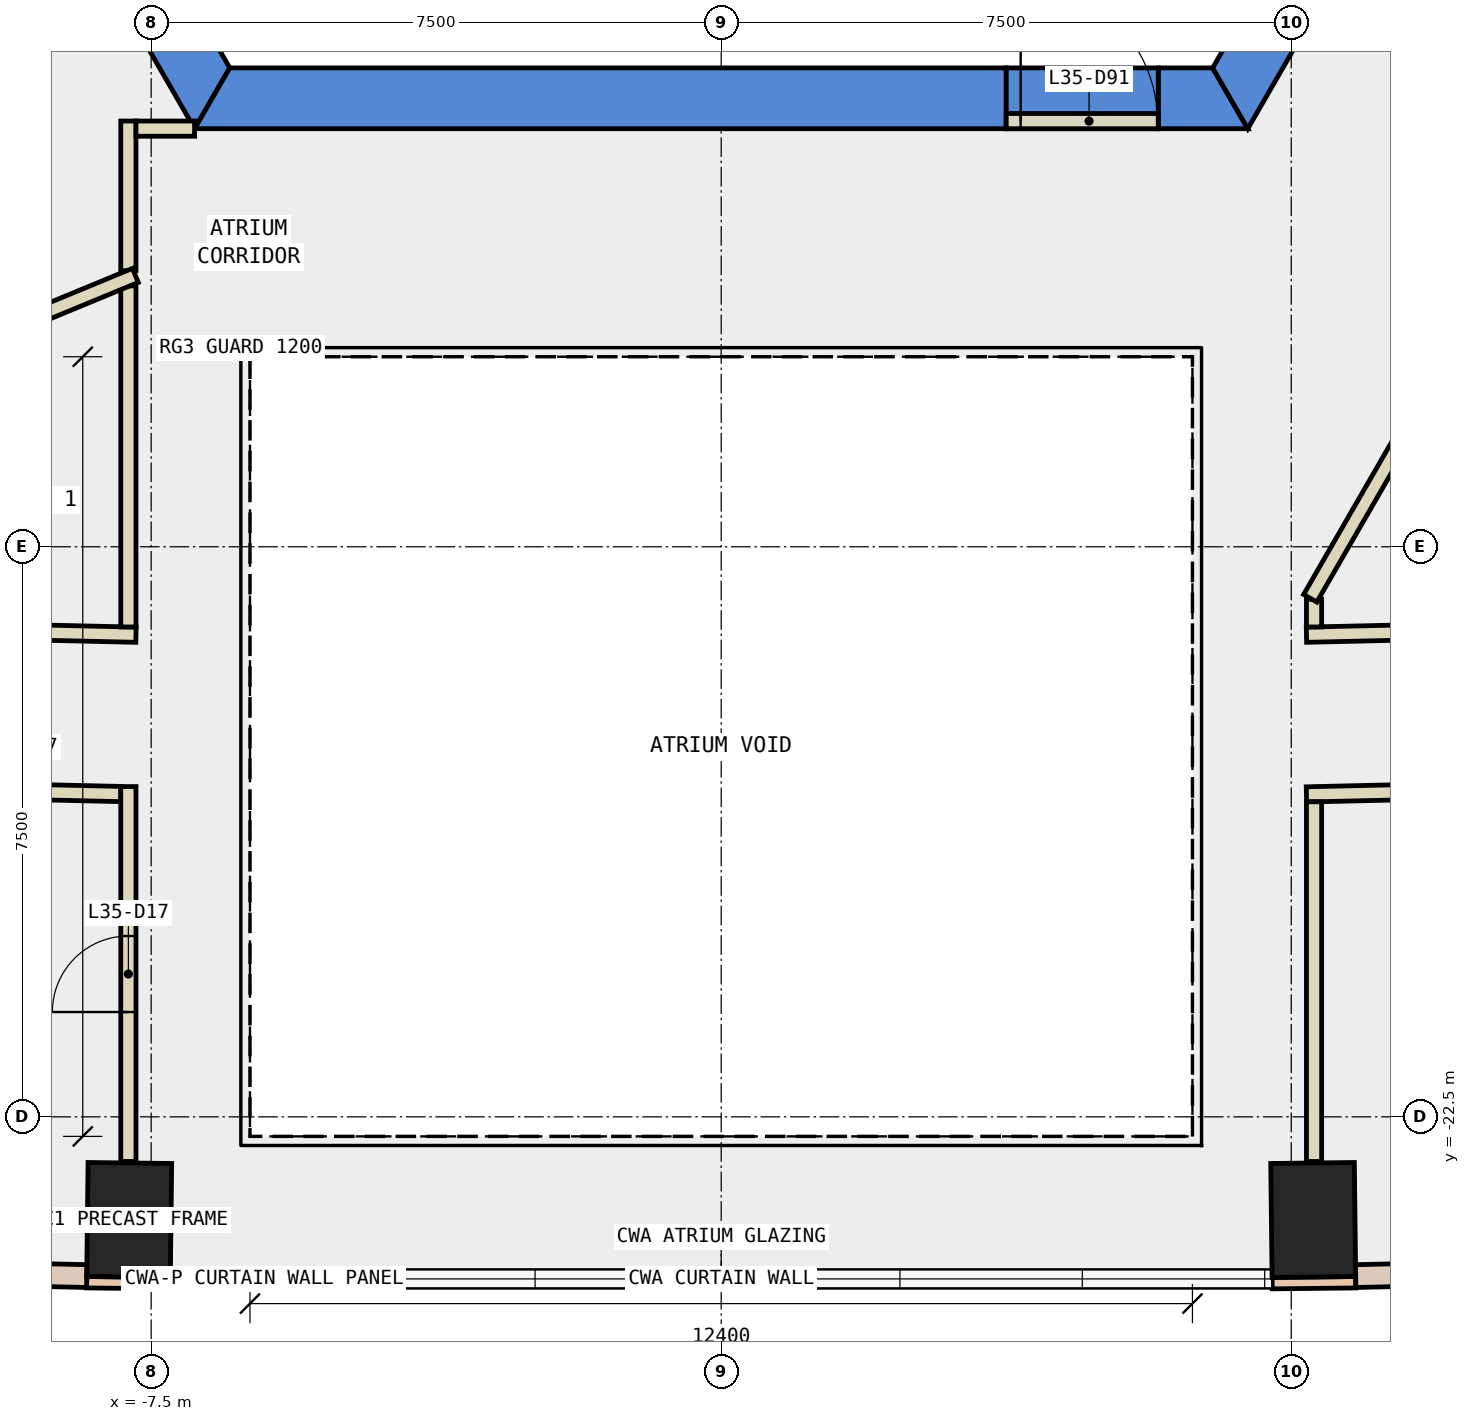
"""IFC4 building model, lengths in metres.
Left out: names, types, materials, properties, quantities, classifications, styles, units other than length and angle.
Written with IfcOpenShell. Run it as: python <this file> out.ifc"""

import sys

from ifc_helpers import new_model, si_unit, direction, frame, frame_2d, origin, origin_2d, place, context, subcontext, project, spatial, polyline, rectangle, outline, extrude, element, fill, save


model = new_model("IFC4")
c1 = context("Model", 3, precision=1e-05, world=origin(), true_north=direction((0.0, 1.0)))
c2 = subcontext(c1, "Body", "Model", "MODEL_VIEW")
j1 = project(units=[si_unit("LENGTHUNIT", "METRE"), si_unit("PLANEANGLEUNIT", "RADIAN")], contexts=[c1])
p1 = place(None, origin())
s1 = spatial("IfcSite", under=j1, at=p1, CompositionType="ELEMENT")
p2 = place(p1, origin())
s2 = spatial("IfcBuilding", under=s1, at=p2, CompositionType="ELEMENT")
p3 = place(p2, frame((0.0, 0.0, 159.2)))
s3 = spatial("IfcBuildingStorey", under=s2, at=p3, CompositionType="ELEMENT", Elevation=159.2)
for number, where, z_axis, x_axis in (
    (1, (-7.789, -23.857, -0.4), (0.0, 0.0, 1.0), (-1.0, 0.012, 0.0)),
    (2, (7.789, -23.857, -0.4), (0.0, 0.0, 1.0), (1.0, 0.012, 0.0)),
):
    element("IfcColumn", number, at=place(p3, frame(where, z_axis=z_axis, x_axis=x_axis)), inside=s3, PredefinedType="COLUMN", context=c2, shape_type="SweptSolid", body=[
        extrude(rectangle(XDim=1.1, YDim=1.5, at=origin_2d()), origin(), (0.0, 0.0, 1.0), 4.2),
    ])
p4 = place(p3, frame((0.0, 0.0, -0.4)))
e3 = element("IfcWall", 3, at=p4, inside=s3, PredefinedType="SHEAR", context=c2, shape_type="SweptSolid", body=[
    extrude(outline(polyline([(-13.856, 2.5), (-6.928, -9.5), (-6.466, -8.7), (-12.933, 2.5), (-13.856, 2.5)])), origin(), (0.0, 0.0, 1.0), 4.2),
])
p5 = place(p3, frame((0.0, 0.0, -0.4)))
e4 = element("IfcWall", 4, at=p5, inside=s3, PredefinedType="SHEAR", context=c2, shape_type="SweptSolid", body=[
    extrude(outline(polyline([(3.75, -9.5), (3.75, -8.7), (-6.466, -8.7), (-6.928, -9.5), (3.75, -9.5)])), origin(), (0.0, 0.0, 1.0), 4.2),
])
p6 = place(p3, frame((0.0, 0.0, -0.4)))
e5 = element("IfcWall", 5, at=p6, inside=s3, PredefinedType="SHEAR", context=c2, shape_type="SweptSolid", body=[
    extrude(outline(polyline([(5.75, -8.7), (5.75, -9.5), (6.928, -9.5), (6.466, -8.7), (5.75, -8.7)])), origin(), (0.0, 0.0, 1.0), 4.2),
])
p7 = place(p3, frame((0.0, 0.0, 3.6)))
e6 = element("IfcWall", 6, at=p7, inside=s3, PredefinedType="SHEAR", context=c2, shape_type="SweptSolid", body=[
    extrude(outline(polyline([(5.75, -9.5), (5.75, -8.7), (3.75, -8.7), (3.75, -9.5), (5.75, -9.5)])), origin(), (0.0, 0.0, 1.0), 0.2),
])
p8 = place(p3, frame((0.0, 0.0, -0.4)))
e7 = element("IfcWall", 7, at=p8, inside=s3, PredefinedType="SHEAR", context=c2, shape_type="SweptSolid", body=[
    extrude(outline(polyline([(8.117, -7.44), (7.424, -7.04), (6.466, -8.7), (6.928, -9.5), (8.117, -7.44)])), origin(), (0.0, 0.0, 1.0), 4.2),
])
for number, where, z_axis, x_axis in (
    (8, (-8.349, -24.676, 0.0), (0.0, 0.0, 1.0), (1.0, -0.011, 0.0)),
    (9, (7.249, -24.688, 0.0), (0.0, 0.0, 1.0), (1.0, 0.011, 0.0)),
):
    element("IfcWall", number, at=place(p3, frame(where, z_axis=z_axis, x_axis=x_axis)), inside=s3, PredefinedType="STANDARD", context=c2, shape_type="SweptSolid", body=[
        extrude(rectangle(XDim=1.1, YDim=0.15, at=frame_2d((0.55, 0.0))), origin(), (0.0, 0.0, 1.0), 3.8),
    ])
p9 = place(p3, frame((-15.68, -24.429, 0.0), z_axis=(0.0, 0.0, 1.0), x_axis=(0.999743825009, -0.022633699594, 0.0)))
e10 = element("IfcWall", 10, at=p9, inside=s3, PredefinedType="STANDARD", context=c2, shape_type="SweptSolid", body=[
    extrude(rectangle(XDim=7.335, YDim=0.3, at=frame_2d((3.667, 0.0))), origin(), (0.0, 0.0, 1.0), 3.8),
])
p10 = place(p9, frame((0.634, 0.0, 0.9)))
e11 = element("IfcOpeningElement", 11, at=p10, cuts=e10, PredefinedType="OPENING", context=c2, shape_type="SweptSolid", body=[
    extrude(rectangle(XDim=2.4, YDim=2.6, at=frame_2d((1.2, 1.3))), frame((0.0, 0.16, 0.0), z_axis=(0.0, -1.0, 0.0), x_axis=(1.0, 0.0, 0.0)), (0.0, 0.0, 1.0), 0.32),
])
p11 = place(p9, frame((4.301, 0.0, 0.9)))
e12 = element("IfcOpeningElement", 12, at=p11, cuts=e10, PredefinedType="OPENING", context=c2, shape_type="SweptSolid", body=[
    extrude(rectangle(XDim=2.4, YDim=2.6, at=frame_2d((1.2, 1.3))), frame((0.0, 0.16, 0.0), z_axis=(0.0, -1.0, 0.0), x_axis=(1.0, 0.0, 0.0)), (0.0, 0.0, 1.0), 0.32),
])
p12 = place(p3, frame((8.347, -24.595, 0.0), z_axis=(0.0, 0.0, 1.0), x_axis=(0.999743825009, 0.022633699594, 0.0)))
e13 = element("IfcWall", 13, at=p12, inside=s3, PredefinedType="STANDARD", context=c2, shape_type="SweptSolid", body=[
    extrude(rectangle(XDim=7.335, YDim=0.3, at=frame_2d((3.667, 0.0))), origin(), (0.0, 0.0, 1.0), 3.8),
])
p13 = place(p12, frame((0.634, 0.0, 0.9)))
e14 = element("IfcOpeningElement", 14, at=p13, cuts=e13, PredefinedType="OPENING", context=c2, shape_type="SweptSolid", body=[
    extrude(rectangle(XDim=2.4, YDim=2.6, at=frame_2d((1.2, 1.3))), frame((0.0, 0.16, 0.0), z_axis=(0.0, -1.0, 0.0), x_axis=(1.0, 0.0, 0.0)), (0.0, 0.0, 1.0), 0.32),
])
p14 = place(p12, frame((4.301, 0.0, 0.9)))
e15 = element("IfcOpeningElement", 15, at=p14, cuts=e13, PredefinedType="OPENING", context=c2, shape_type="SweptSolid", body=[
    extrude(rectangle(XDim=2.4, YDim=2.6, at=frame_2d((1.2, 1.3))), frame((0.0, 0.16, 0.0), z_axis=(0.0, -1.0, 0.0), x_axis=(1.0, 0.0, 0.0)), (0.0, 0.0, 1.0), 0.32),
])
p15 = place(p3, frame((7.7, -16.157, 0.0), z_axis=(0.0, 0.0, 1.0), x_axis=(0.999744539931, 0.022602098978, 0.0)))
e16 = element("IfcWall", 16, at=p15, inside=s3, PredefinedType="PARTITIONING", context=c2, shape_type="SweptSolid", body=[
    extrude(rectangle(XDim=8.274, YDim=0.2, at=frame_2d((4.137, 0.0))), origin(), (0.0, 0.0, 1.0), 3.8),
])
p16 = place(p15, frame((3.237, 0.0, 0.0)))
e17 = element("IfcOpeningElement", 17, at=p16, cuts=e16, PredefinedType="OPENING", context=c2, shape_type="SweptSolid", body=[
    extrude(rectangle(XDim=1.8, YDim=2.1, at=frame_2d((0.9, 1.05))), frame((0.0, 0.11, 0.0), z_axis=(0.0, -1.0, 0.0), x_axis=(1.0, 0.0, 0.0)), (0.0, 0.0, 1.0), 0.22),
])
p17 = place(p3, frame((-14.356, -16.006, 0.0), z_axis=(0.0, 0.0, 1.0), x_axis=(0.999743177933, -0.022662263286, 0.0)))
e18 = element("IfcWall", 18, at=p17, inside=s3, PredefinedType="PARTITIONING", context=c2, shape_type="SweptSolid", body=[
    extrude(rectangle(XDim=6.658, YDim=0.2, at=frame_2d((3.329, 0.0))), origin(), (0.0, 0.0, 1.0), 3.8),
])
p18 = place(p17, frame((2.829, 0.0, 0.0)))
e19 = element("IfcOpeningElement", 19, at=p18, cuts=e18, PredefinedType="OPENING", context=c2, shape_type="SweptSolid", body=[
    extrude(rectangle(XDim=1.0, YDim=2.1, at=frame_2d((0.5, 1.05))), frame((0.0, 0.11, 0.0), z_axis=(0.0, -1.0, 0.0), x_axis=(1.0, 0.0, 0.0)), (0.0, 0.0, 1.0), 0.22),
])
p19 = place(p3, frame((16.111, -18.067, 0.0), z_axis=(0.0, 0.0, 1.0), x_axis=(-0.999741835545, -0.022721405353, 0.0)))
e20 = element("IfcWall", 20, at=p19, inside=s3, PredefinedType="PARTITIONING", context=c2, shape_type="SweptSolid", body=[
    extrude(rectangle(XDim=8.413, YDim=0.2, at=frame_2d((4.207, 0.0))), origin(), (0.0, 0.0, 1.0), 3.8),
])
p20 = place(p19, frame((3.706, 0.0, 0.0)))
e21 = element("IfcOpeningElement", 21, at=p20, cuts=e20, PredefinedType="OPENING", context=c2, shape_type="SweptSolid", body=[
    extrude(rectangle(XDim=1.0, YDim=2.1, at=frame_2d((0.5, 1.05))), frame((0.0, 0.11, 0.0), z_axis=(0.0, -1.0, 0.0), x_axis=(1.0, 0.0, 0.0)), (0.0, 0.0, 1.0), 0.22),
])
p21 = place(p3, frame((-7.9, -18.253, 0.0), z_axis=(0.0, 0.0, 1.0), x_axis=(-0.999745510411, 0.022559131487, 0.0)))
e22 = element("IfcWall", 22, at=p21, inside=s3, PredefinedType="PARTITIONING", context=c2, shape_type="SweptSolid", body=[
    extrude(rectangle(XDim=3.896, YDim=0.2, at=frame_2d((1.948, 0.0))), origin(), (0.0, 0.0, 1.0), 3.8),
])
p22 = place(p3, frame((7.8, -15.69, 0.0), z_axis=(0.0, 0.0, 1.0), x_axis=(0.0, -1.0, 0.0)))
e23 = element("IfcWall", 23, at=p22, inside=s3, PredefinedType="PARTITIONING", context=c2, shape_type="SweptSolid", body=[
    extrude(rectangle(XDim=0.365, YDim=0.2, at=frame_2d((0.183, 0.0))), origin(), (0.0, 0.0, 1.0), 3.8),
])
p23 = place(p3, frame((-7.8, -11.368, 0.0), z_axis=(0.0, 0.0, 1.0), x_axis=(0.0, 1.0, 0.0)))
e24 = element("IfcWall", 24, at=p23, inside=s3, PredefinedType="PARTITIONING", context=c2, shape_type="SweptSolid", body=[
    extrude(rectangle(XDim=1.969, YDim=0.2, at=frame_2d((0.984, 0.0))), origin(), (0.0, 0.0, 1.0), 3.8),
])
p24 = place(p3, frame((-7.7, -9.499, 0.0), z_axis=(0.0, 0.0, 1.0), x_axis=(1.0, 0.0, 0.0)))
e25 = element("IfcWall", 25, at=p24, inside=s3, PredefinedType="PARTITIONING", context=c2, shape_type="SweptSolid", body=[
    extrude(rectangle(XDim=0.771, YDim=0.2, at=frame_2d((0.385, 0.0))), origin(), (0.0, 0.0, 1.0), 3.8),
])
p25 = place(p3, frame((-7.8, -16.055, 0.0), z_axis=(0.0, 0.0, 1.0), x_axis=(0.0, 1.0, 0.0)))
e26 = element("IfcWall", 26, at=p25, inside=s3, PredefinedType="PARTITIONING", context=c2, shape_type="SweptSolid", body=[
    extrude(rectangle(XDim=4.487, YDim=0.2, at=frame_2d((2.243, 0.0))), origin(), (0.0, 0.0, 1.0), 3.8),
])
p26 = place(p3, frame((7.8, -18.355, 0.0), z_axis=(0.0, 0.0, 1.0), x_axis=(0.0, -1.0, 0.0)))
e27 = element("IfcWall", 27, at=p26, inside=s3, PredefinedType="PARTITIONING", context=c2, shape_type="SweptSolid", body=[
    extrude(rectangle(XDim=4.732, YDim=0.2, at=frame_2d((2.366, 0.0))), origin(), (0.0, 0.0, 1.0), 3.8),
])
p27 = place(p3, frame((-7.8, -23.087, 0.0), z_axis=(0.0, 0.0, 1.0), x_axis=(0.0, 1.0, 0.0)))
e28 = element("IfcWall", 28, at=p27, inside=s3, PredefinedType="PARTITIONING", context=c2, shape_type="SweptSolid", body=[
    extrude(rectangle(XDim=4.932, YDim=0.2, at=frame_2d((2.466, 0.0))), origin(), (0.0, 0.0, 1.0), 3.8),
])
p28 = place(p27, frame((1.966, 0.0, 0.0)))
e29 = element("IfcOpeningElement", 29, at=p28, cuts=e28, PredefinedType="OPENING", context=c2, shape_type="SweptSolid", body=[
    extrude(rectangle(XDim=1.0, YDim=2.1, at=frame_2d((0.5, 1.05))), frame((0.0, 0.11, 0.0), z_axis=(0.0, -1.0, 0.0), x_axis=(1.0, 0.0, 0.0)), (0.0, 0.0, 1.0), 0.22),
])
p29 = place(p3, frame((-7.708, -11.43, 0.0), z_axis=(0.0, 0.0, 1.0), x_axis=(-0.924285151797, -0.381702709144, 0.0)))
e30 = element("IfcWall", 30, at=p29, inside=s3, PredefinedType="PARTITIONING", context=c2, shape_type="SweptSolid", body=[
    extrude(rectangle(XDim=8.129, YDim=0.2, at=frame_2d((4.065, 0.0))), origin(), (0.0, 0.0, 1.0), 3.8),
])
p30 = place(p3, frame((3.75, -9.4, 0.0), z_axis=(0.0, 0.0, 1.0), x_axis=(1.0, 0.0, 0.0)))
e31 = element("IfcWall", 31, at=p30, inside=s3, PredefinedType="PARTITIONING", context=c2, shape_type="SweptSolid", body=[
    extrude(rectangle(XDim=2.0, YDim=0.2, at=frame_2d((1.0, 0.0))), origin(), (0.0, 0.0, 1.0), 2.4),
])
p31 = place(p30, frame((0.19, 0.0, 0.0)))
e32 = element("IfcOpeningElement", 32, at=p31, cuts=e31, PredefinedType="OPENING", context=c2, shape_type="SweptSolid", body=[
    extrude(rectangle(XDim=1.8, YDim=2.1, at=frame_2d((0.9, 1.05))), frame((0.0, 0.11, 0.0), z_axis=(0.0, -1.0, 0.0), x_axis=(1.0, 0.0, 0.0)), (0.0, 0.0, 1.0), 0.22),
])
p32 = place(p3, frame((12.401, -7.621, 0.0), z_axis=(0.0, 0.0, 1.0), x_axis=(-0.499983724212, -0.866034800411, 0.0)))
e33 = element("IfcWall", 33, at=p32, inside=s3, PredefinedType="PARTITIONING", context=c2, shape_type="SweptSolid", body=[
    extrude(rectangle(XDim=9.302, YDim=0.2, at=frame_2d((4.651, 0.0))), origin(), (0.0, 0.0, 1.0), 3.8),
])
p33 = place(p28, origin())
e34 = element("IfcDoor", 34, at=p33, inside=s3, OperationType="SINGLE_SWING_LEFT", PredefinedType="DOOR", context=c2, shape_type="SweptSolid", body=[
    extrude(rectangle(XDim=1.0, YDim=2.1, at=frame_2d((0.5, 1.05))), frame((0.0, 0.025, 0.0), z_axis=(0.0, -1.0, 0.0), x_axis=(1.0, 0.0, 0.0)), (0.0, 0.0, 1.0), 0.05),
])
fill(e29, e34)
p34 = place(p31, origin())
e35 = element("IfcDoor", 35, at=p34, inside=s3, OperationType="DOUBLE_DOOR_SINGLE_SWING", PredefinedType="DOOR", context=c2, shape_type="SweptSolid", body=[
    extrude(rectangle(XDim=1.8, YDim=2.1, at=frame_2d((0.9, 1.05))), frame((0.0, 0.025, 0.0), z_axis=(0.0, -1.0, 0.0), x_axis=(1.0, 0.0, 0.0)), (0.0, 0.0, 1.0), 0.05),
])
fill(e32, e35)
save(model, sys.argv[1])
